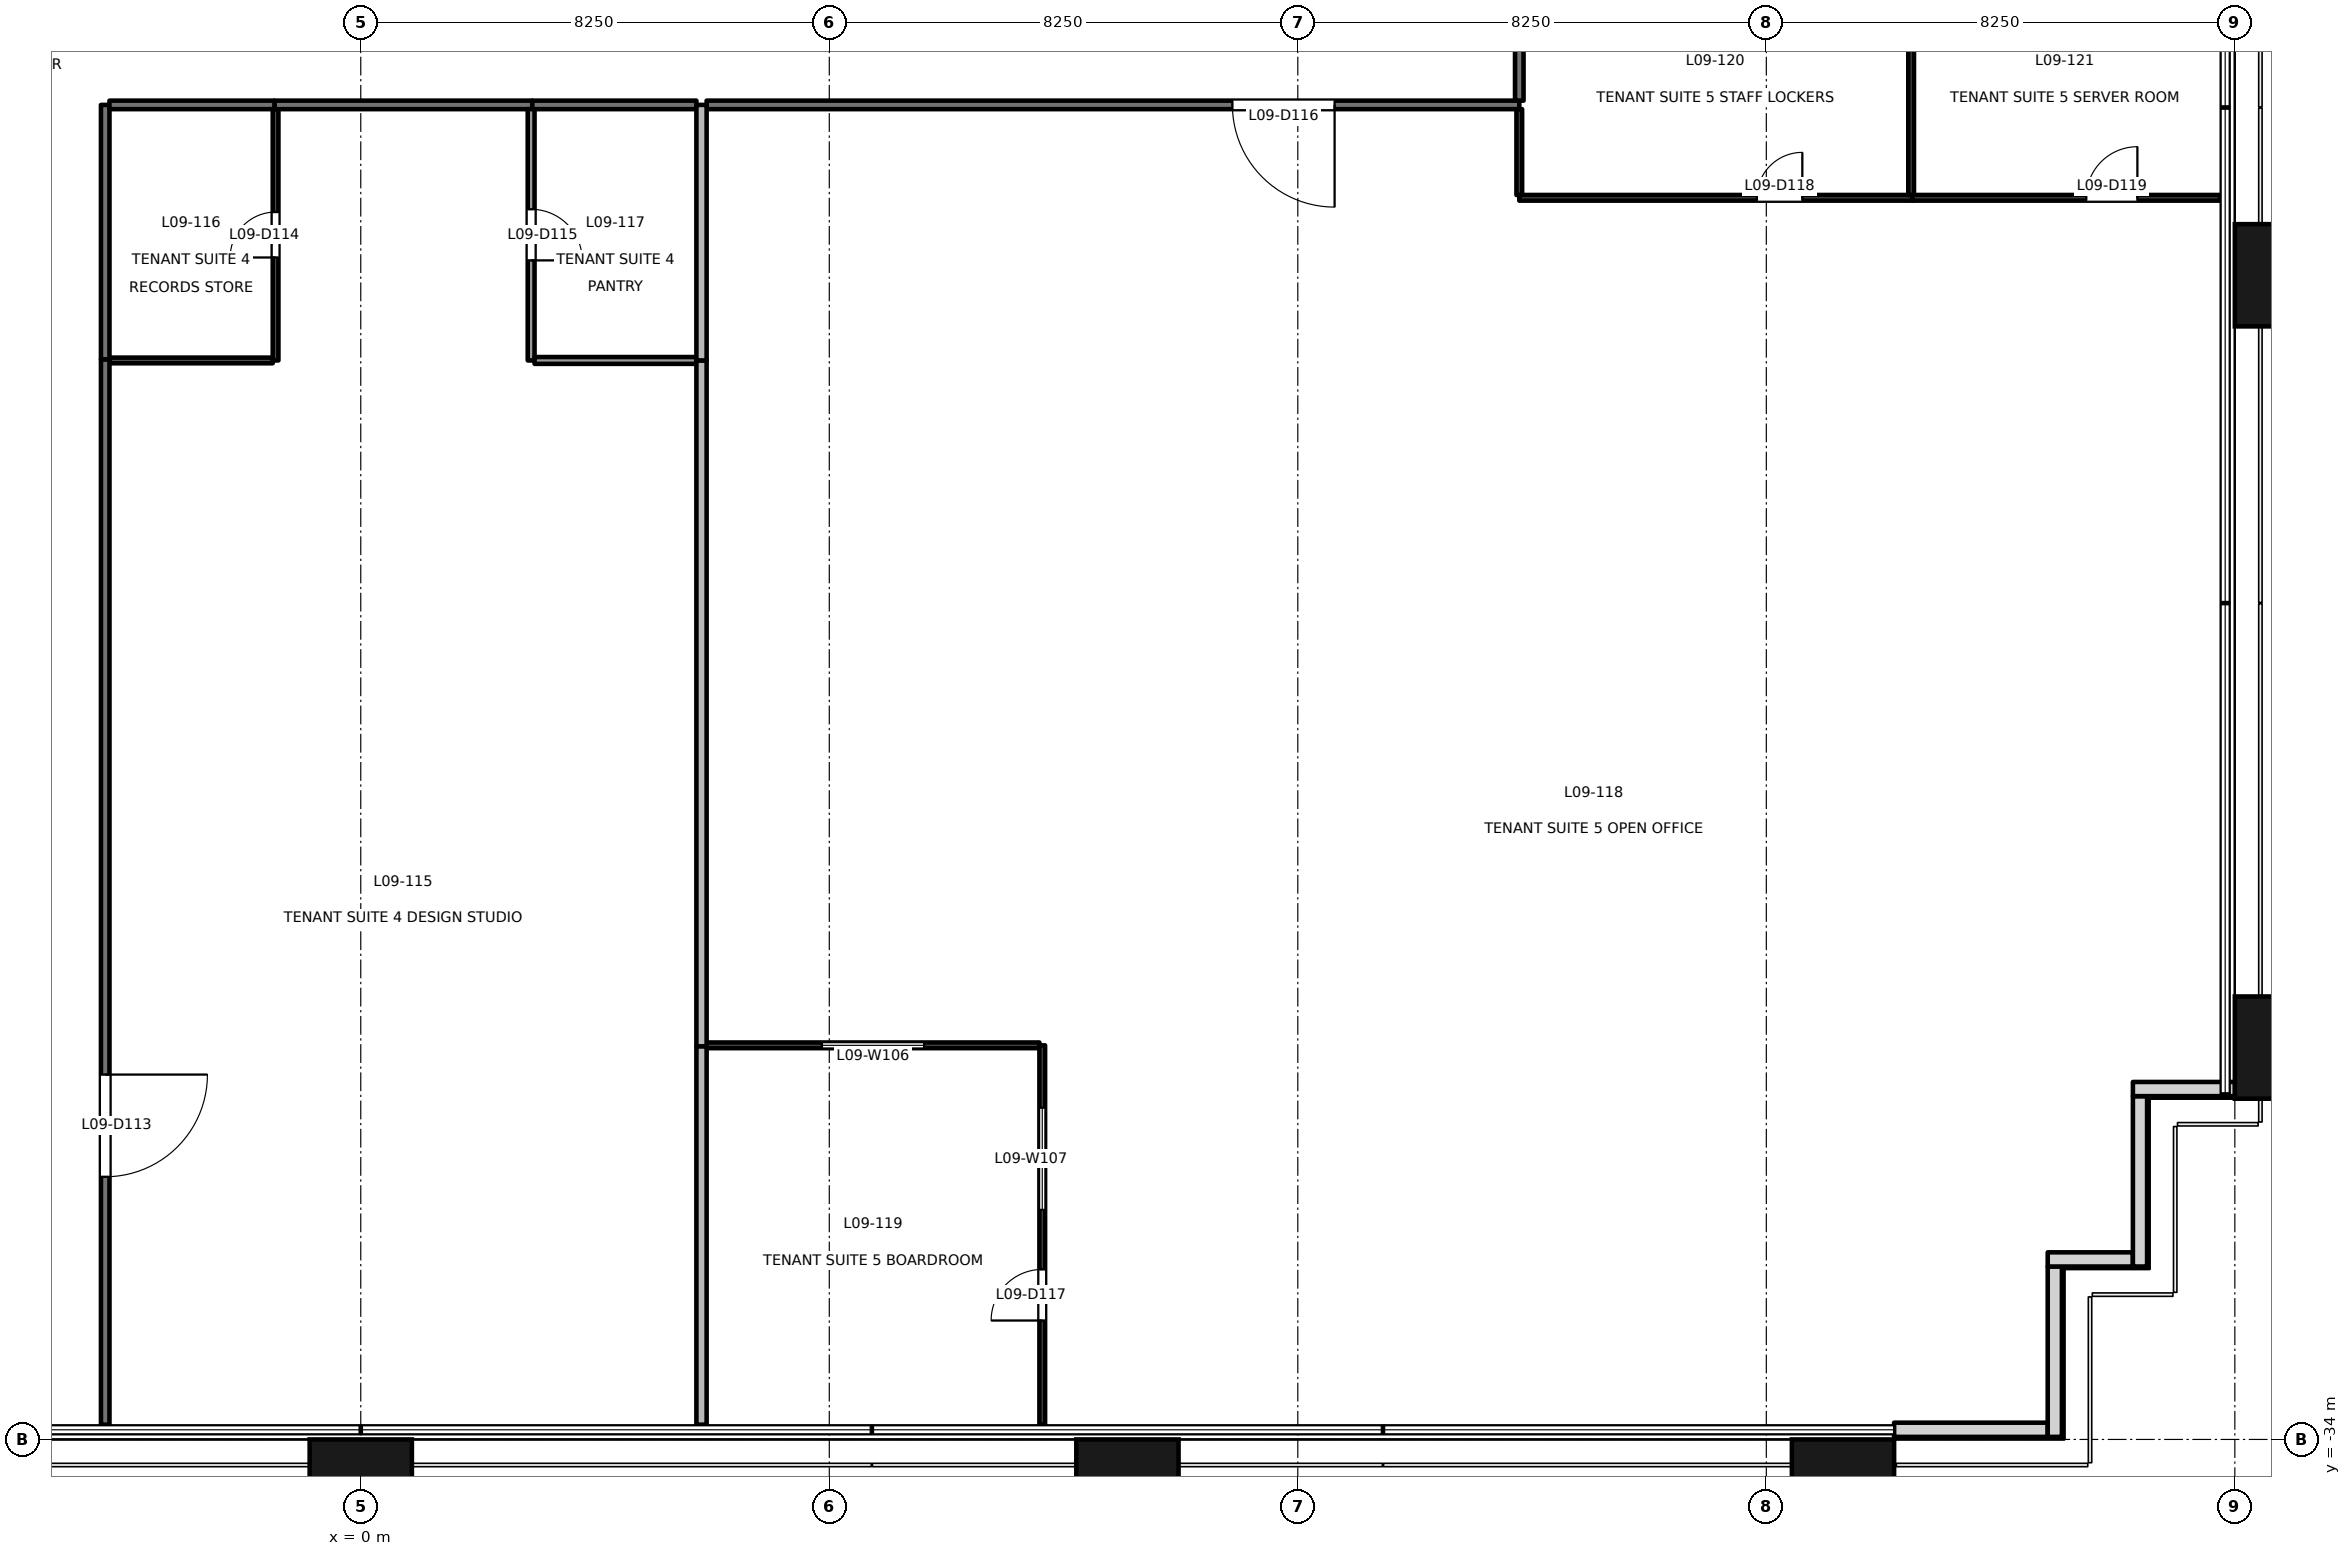
"""IFC4 building model, lengths in metres.
Left out: names, types, materials, properties, quantities, classifications, styles, units other than length and angle.
Written with IfcOpenShell. Run it as: python <this file> out.ifc"""

import sys

from ifc_helpers import new_model, si_unit, direction, frame, frame_2d, origin, origin_2d, place, context, subcontext, project, spatial, rectangle, extrude, element, fill, save


model = new_model("IFC4")
c1 = context("Model", 3, precision=1e-05, world=origin(), true_north=direction((0.0, 1.0)))
c2 = subcontext(c1, "Body", "Model", "MODEL_VIEW")
j1 = project(units=[si_unit("LENGTHUNIT", "METRE"), si_unit("PLANEANGLEUNIT", "RADIAN")], contexts=[c1])
p1 = place(None, origin())
s1 = spatial("IfcSite", under=j1, at=p1, CompositionType="ELEMENT")
p2 = place(p1, origin())
s2 = spatial("IfcBuilding", under=s1, at=p2, CompositionType="ELEMENT")
p3 = place(p2, frame((0.0, 0.0, 44.7)))
s3 = spatial("IfcBuildingStorey", under=s2, at=p3, CompositionType="ELEMENT", Elevation=44.7)
for number, where, z_axis, x_axis in (
    (1, (0.0, -34.9, -0.2), (0.0, 0.0, 1.0), (1.0, 0.0, 0.0)),
    (2, (13.5, -34.9, -0.2), (0.0, 0.0, 1.0), (1.0, 0.0, 0.0)),
    (3, (26.1, -34.9, -0.2), (0.0, 0.0, 1.0), (1.0, 0.0, 0.0)),
    (4, (33.9, -27.1, -0.2), (0.0, 0.0, 1.0), (0.0, 1.0, 0.0)),
    (5, (33.9, -13.5, -0.2), (0.0, 0.0, 1.0), (0.0, 1.0, 0.0)),
):
    element("IfcColumn", number, at=place(p3, frame(where, z_axis=z_axis, x_axis=x_axis)), inside=s3, PredefinedType="COLUMN", context=c2, shape_type="SweptSolid", body=[
        extrude(rectangle(XDim=1.8, YDim=1.8, at=origin_2d()), origin(), (0.0, 0.0, 1.0), 4.1),
    ])
p4 = place(p3, frame((27.0, -33.83, 0.0), z_axis=(0.0, 0.0, 1.0), x_axis=(1.0, 0.0, 0.0)))
e6 = element("IfcWall", 6, at=p4, inside=s3, PredefinedType="SOLIDWALL", context=c2, shape_type="SweptSolid", body=[
    extrude(rectangle(XDim=2.705, YDim=0.25, at=frame_2d((1.353, 0.0))), origin(), (0.0, 0.0, 1.0), 3.9),
])
p5 = place(p3, frame((29.83, -33.955, 0.0), z_axis=(0.0, 0.0, 1.0), x_axis=(0.0, 1.0, 0.0)))
e7 = element("IfcWall", 7, at=p5, inside=s3, PredefinedType="SOLIDWALL", context=c2, shape_type="SweptSolid", body=[
    extrude(rectangle(XDim=3.0, YDim=0.25, at=frame_2d((1.5, 0.0))), origin(), (0.0, 0.0, 1.0), 3.9),
])
p6 = place(p3, frame((29.705, -30.83, 0.0), z_axis=(0.0, 0.0, 1.0), x_axis=(1.0, 0.0, 0.0)))
e8 = element("IfcWall", 8, at=p6, inside=s3, PredefinedType="SOLIDWALL", context=c2, shape_type="SweptSolid", body=[
    extrude(rectangle(XDim=1.5, YDim=0.25, at=frame_2d((0.75, 0.0))), origin(), (0.0, 0.0, 1.0), 3.9),
])
p7 = place(p3, frame((31.33, -30.955, 0.0), z_axis=(0.0, 0.0, 1.0), x_axis=(0.0, 1.0, 0.0)))
e9 = element("IfcWall", 9, at=p7, inside=s3, PredefinedType="SOLIDWALL", context=c2, shape_type="SweptSolid", body=[
    extrude(rectangle(XDim=3.0, YDim=0.25, at=frame_2d((1.5, 0.0))), origin(), (0.0, 0.0, 1.0), 3.9),
])
p8 = place(p3, frame((31.205, -27.83, 0.0), z_axis=(0.0, 0.0, 1.0), x_axis=(1.0, 0.0, 0.0)))
e10 = element("IfcWall", 10, at=p8, inside=s3, PredefinedType="SOLIDWALL", context=c2, shape_type="SweptSolid", body=[
    extrude(rectangle(XDim=1.8, YDim=0.25, at=frame_2d((0.9, 0.0))), origin(), (0.0, 0.0, 1.0), 3.9),
])
p9 = place(p3, frame((-4.5, -14.98, 0.0), z_axis=(0.0, 0.0, 1.0), x_axis=(0.0, -1.0, 0.0)))
e11 = element("IfcWall", 11, at=p9, inside=s3, PredefinedType="PARTITIONING", context=c2, shape_type="SweptSolid", body=[
    extrude(rectangle(XDim=18.76, YDim=0.15, at=frame_2d((9.38, 0.0))), origin(), (0.0, 0.0, 1.0), 2.9),
])
p10 = place(p9, frame((12.595, 0.0, 0.0)))
e12 = element("IfcOpeningElement", 12, at=p10, cuts=e11, PredefinedType="OPENING", context=c2, shape_type="SweptSolid", body=[
    extrude(rectangle(XDim=1.8, YDim=2.1, at=frame_2d((0.9, 1.05))), frame((0.0, 0.085, 0.0), z_axis=(0.0, -1.0, 0.0), x_axis=(1.0, 0.0, 0.0)), (0.0, 0.0, 1.0), 0.171),
])
p11 = place(p3, frame((3.02, -10.5, 0.0), z_axis=(0.0, 0.0, 1.0), x_axis=(-1.0, 0.0, 0.0)))
e13 = element("IfcWall", 13, at=p11, inside=s3, PredefinedType="PARTITIONING", context=c2, shape_type="SweptSolid", body=[
    extrude(rectangle(XDim=4.54, YDim=0.15, at=frame_2d((2.27, 0.0))), origin(), (0.0, 0.0, 1.0), 2.9),
])
p12 = place(p3, frame((-4.5, -10.5, 0.0), z_axis=(0.0, 0.0, 1.0), x_axis=(0.0, -1.0, 0.0)))
e14 = element("IfcWall", 14, at=p12, inside=s3, PredefinedType="PARTITIONING", context=c2, shape_type="SweptSolid", body=[
    extrude(rectangle(XDim=4.48, YDim=0.15, at=frame_2d((2.24, 0.0))), origin(), (0.0, 0.0, 1.0), 2.9),
])
p13 = place(p3, frame((-1.52, -10.5, 0.0), z_axis=(0.0, 0.0, 1.0), x_axis=(-1.0, 0.0, 0.0)))
e15 = element("IfcWall", 15, at=p13, inside=s3, PredefinedType="PARTITIONING", context=c2, shape_type="SweptSolid", body=[
    extrude(rectangle(XDim=2.905, YDim=0.15, at=frame_2d((1.453, 0.0))), origin(), (0.0, 0.0, 1.0), 2.9),
])
p14 = place(p3, frame((5.91, -10.5, 0.0), z_axis=(0.0, 0.0, 1.0), x_axis=(-1.0, 0.0, 0.0)))
e16 = element("IfcWall", 16, at=p14, inside=s3, PredefinedType="PARTITIONING", context=c2, shape_type="SweptSolid", body=[
    extrude(rectangle(XDim=2.89, YDim=0.15, at=frame_2d((1.445, 0.0))), origin(), (0.0, 0.0, 1.0), 2.9),
])
p15 = place(p3, frame((20.4, -10.5, 0.0), z_axis=(0.0, 0.0, 1.0), x_axis=(-1.0, 0.0, 0.0)))
e17 = element("IfcWall", 17, at=p15, inside=s3, PredefinedType="PARTITIONING", context=c2, shape_type="SweptSolid", body=[
    extrude(rectangle(XDim=14.31, YDim=0.15, at=frame_2d((7.155, 0.0))), origin(), (0.0, 0.0, 1.0), 2.5),
])
p16 = place(p15, frame((3.252, 0.0, 0.0)))
e18 = element("IfcOpeningElement", 18, at=p16, cuts=e17, PredefinedType="OPENING", context=c2, shape_type="SweptSolid", body=[
    extrude(rectangle(XDim=1.8, YDim=2.1, at=frame_2d((0.9, 1.05))), frame((0.0, 0.085, 0.0), z_axis=(0.0, -1.0, 0.0), x_axis=(1.0, 0.0, 0.0)), (0.0, 0.0, 1.0), 0.171),
])
p17 = place(p3, frame((20.4, -7.726, 0.0), z_axis=(0.0, 0.0, 1.0), x_axis=(0.0, -1.0, 0.0)))
e19 = element("IfcWall", 19, at=p17, inside=s3, PredefinedType="PARTITIONING", context=c2, shape_type="SweptSolid", body=[
    extrude(rectangle(XDim=2.699, YDim=0.15, at=frame_2d((1.35, 0.0))), origin(), (0.0, 0.0, 1.0), 3.3),
])
p18 = place(p3, frame((-4.425, -15.0, 0.0), z_axis=(0.0, 0.0, 1.0), x_axis=(1.0, 0.0, 0.0)))
e20 = element("IfcWall", 20, at=p18, inside=s3, PredefinedType="PARTITIONING", context=c2, shape_type="SweptSolid", body=[
    extrude(rectangle(XDim=2.875, YDim=0.1, at=frame_2d((1.438, 0.0))), origin(), (0.0, 0.0, 1.0), 2.9),
])
p19 = place(p3, frame((-1.5, -15.0, 0.0), z_axis=(0.0, 0.0, 1.0), x_axis=(0.0, 1.0, 0.0)))
e21 = element("IfcWall", 21, at=p19, inside=s3, PredefinedType="PARTITIONING", context=c2, shape_type="SweptSolid", body=[
    extrude(rectangle(XDim=4.425, YDim=0.1, at=frame_2d((2.212, 0.0))), origin(), (0.0, 0.0, 1.0), 3.9),
])
p20 = place(p19, frame((1.813, 0.0, 0.0)))
e22 = element("IfcOpeningElement", 22, at=p20, cuts=e21, PredefinedType="OPENING", context=c2, shape_type="SweptSolid", body=[
    extrude(rectangle(XDim=0.8, YDim=2.1, at=frame_2d((0.4, 1.05))), frame((0.0, 0.061, 0.0), z_axis=(0.0, -1.0, 0.0), x_axis=(1.0, 0.0, 0.0)), (0.0, 0.0, 1.0), 0.121),
])
p21 = place(p3, frame((3.0, -10.575, 0.0), z_axis=(0.0, 0.0, 1.0), x_axis=(0.0, -1.0, 0.0)))
e23 = element("IfcWall", 23, at=p21, inside=s3, PredefinedType="PARTITIONING", context=c2, shape_type="SweptSolid", body=[
    extrude(rectangle(XDim=4.425, YDim=0.12, at=frame_2d((2.212, 0.0))), origin(), (0.0, 0.0, 1.0), 3.9),
])
p22 = place(p21, frame((1.763, 0.0, 0.0)))
e24 = element("IfcOpeningElement", 24, at=p22, cuts=e23, PredefinedType="OPENING", context=c2, shape_type="SweptSolid", body=[
    extrude(rectangle(XDim=0.9, YDim=2.1, at=frame_2d((0.45, 1.05))), frame((0.0, 0.071, 0.0), z_axis=(0.0, -1.0, 0.0), x_axis=(1.0, 0.0, 0.0)), (0.0, 0.0, 1.0), 0.141),
])
p23 = place(p3, frame((3.06, -15.0, 0.0), z_axis=(0.0, 0.0, 1.0), x_axis=(1.0, 0.0, 0.0)))
e25 = element("IfcWall", 25, at=p23, inside=s3, PredefinedType="PARTITIONING", context=c2, shape_type="SweptSolid", body=[
    extrude(rectangle(XDim=2.85, YDim=0.12, at=frame_2d((1.425, 0.0))), origin(), (0.0, 0.0, 1.0), 2.9),
])
p24 = place(p3, frame((6.0, -15.0, 0.0), z_axis=(0.0, 0.0, 1.0), x_axis=(0.0, -1.0, 0.0)))
e26 = element("IfcWall", 26, at=p24, inside=s3, PredefinedType="PARTITIONING", context=c2, shape_type="SweptSolid", body=[
    extrude(rectangle(XDim=12.08, YDim=0.18, at=frame_2d((6.04, 0.0))), origin(), (0.0, 0.0, 1.0), 3.9),
])
p25 = place(p3, frame((6.0, -27.08, 0.0), z_axis=(0.0, 0.0, 1.0), x_axis=(0.0, -1.0, 0.0)))
e27 = element("IfcWall", 27, at=p25, inside=s3, PredefinedType="PARTITIONING", context=c2, shape_type="SweptSolid", body=[
    extrude(rectangle(XDim=6.66, YDim=0.18, at=frame_2d((3.33, 0.0))), origin(), (0.0, 0.0, 1.0), 3.9),
])
p26 = place(p3, frame((6.0, -10.5, 0.0), z_axis=(0.0, 0.0, 1.0), x_axis=(0.0, -1.0, 0.0)))
e28 = element("IfcWall", 28, at=p26, inside=s3, PredefinedType="PARTITIONING", context=c2, shape_type="SweptSolid", body=[
    extrude(rectangle(XDim=4.5, YDim=0.18, at=frame_2d((2.25, 0.0))), origin(), (0.0, 0.0, 1.0), 3.9),
])
p27 = place(p3, frame((11.95, -27.06, 0.0), z_axis=(0.0, 0.0, 1.0), x_axis=(-1.0, 0.0, 0.0)))
e29 = element("IfcWall", 29, at=p27, inside=s3, PredefinedType="PARTITIONING", context=c2, shape_type="SweptSolid", body=[
    extrude(rectangle(XDim=5.86, YDim=0.1, at=frame_2d((2.93, 0.0))), origin(), (0.0, 0.0, 1.0), 2.9),
])
p28 = place(p27, frame((2.03, 0.0, 0.9)))
e30 = element("IfcOpeningElement", 30, at=p28, cuts=e29, PredefinedType="OPENING", context=c2, shape_type="SweptSolid", body=[
    extrude(rectangle(XDim=1.8, YDim=1.2, at=frame_2d((0.9, 0.6))), frame((0.0, 0.061, 0.0), z_axis=(0.0, -1.0, 0.0), x_axis=(1.0, 0.0, 0.0)), (0.0, 0.0, 1.0), 0.121),
])
p29 = place(p3, frame((12.0, -33.74, 0.0), z_axis=(0.0, 0.0, 1.0), x_axis=(0.0, 1.0, 0.0)))
e31 = element("IfcWall", 31, at=p29, inside=s3, PredefinedType="PARTITIONING", context=c2, shape_type="SweptSolid", body=[
    extrude(rectangle(XDim=6.68, YDim=0.1, at=frame_2d((3.34, 0.0))), origin(), (0.0, 0.0, 1.0), 3.9),
])
p30 = place(p29, frame((1.834, 0.0, 0.0)))
e32 = element("IfcOpeningElement", 32, at=p30, cuts=e31, PredefinedType="OPENING", context=c2, shape_type="SweptSolid", body=[
    extrude(rectangle(XDim=0.9, YDim=2.1, at=frame_2d((0.45, 1.05))), frame((0.0, 0.061, 0.0), z_axis=(0.0, -1.0, 0.0), x_axis=(1.0, 0.0, 0.0)), (0.0, 0.0, 1.0), 0.121),
])
p31 = place(p29, frame((3.782, 0.0, 0.9)))
e33 = element("IfcOpeningElement", 33, at=p31, cuts=e31, PredefinedType="OPENING", context=c2, shape_type="SweptSolid", body=[
    extrude(rectangle(XDim=1.8, YDim=1.2, at=frame_2d((0.9, 0.6))), frame((0.0, 0.061, 0.0), z_axis=(0.0, -1.0, 0.0), x_axis=(1.0, 0.0, 0.0)), (0.0, 0.0, 1.0), 0.121),
])
p32 = place(p3, frame((20.4, -12.136, 0.0), z_axis=(0.0, 0.0, 1.0), x_axis=(1.0, 0.0, 0.0)))
e34 = element("IfcWall", 34, at=p32, inside=s3, PredefinedType="PARTITIONING", context=c2, shape_type="SweptSolid", body=[
    extrude(rectangle(XDim=6.92, YDim=0.1, at=frame_2d((3.46, 0.0))), origin(), (0.0, 0.0, 1.0), 3.9),
])
p33 = place(p32, frame((4.184, 0.0, 0.0)))
e35 = element("IfcOpeningElement", 35, at=p33, cuts=e34, PredefinedType="OPENING", context=c2, shape_type="SweptSolid", body=[
    extrude(rectangle(XDim=0.8, YDim=2.1, at=frame_2d((0.4, 1.05))), frame((0.0, 0.061, 0.0), z_axis=(0.0, -1.0, 0.0), x_axis=(1.0, 0.0, 0.0)), (0.0, 0.0, 1.0), 0.121),
])
p34 = place(p3, frame((20.4, -10.575, 0.0), z_axis=(0.0, 0.0, 1.0), x_axis=(0.0, -1.0, 0.0)))
e36 = element("IfcWall", 36, at=p34, inside=s3, PredefinedType="PARTITIONING", context=c2, shape_type="SweptSolid", body=[
    extrude(rectangle(XDim=1.511, YDim=0.1, at=frame_2d((0.755, 0.0))), origin(), (0.0, 0.0, 1.0), 3.9),
])
p35 = place(p3, frame((27.32, -12.136, 0.0), z_axis=(0.0, 0.0, 1.0), x_axis=(1.0, 0.0, 0.0)))
e37 = element("IfcWall", 37, at=p35, inside=s3, PredefinedType="PARTITIONING", context=c2, shape_type="SweptSolid", body=[
    extrude(rectangle(XDim=5.42, YDim=0.1, at=frame_2d((2.71, 0.0))), origin(), (0.0, 0.0, 1.0), 3.9),
])
p36 = place(p35, frame((3.064, 0.0, 0.0)))
e38 = element("IfcOpeningElement", 38, at=p36, cuts=e37, PredefinedType="OPENING", context=c2, shape_type="SweptSolid", body=[
    extrude(rectangle(XDim=0.9, YDim=2.1, at=frame_2d((0.45, 1.05))), frame((0.0, 0.061, 0.0), z_axis=(0.0, -1.0, 0.0), x_axis=(1.0, 0.0, 0.0)), (0.0, 0.0, 1.0), 0.121),
])
p37 = place(p3, frame((27.3, -7.726, 0.0), z_axis=(0.0, 0.0, 1.0), x_axis=(0.0, -1.0, 0.0)))
e39 = element("IfcWall", 39, at=p37, inside=s3, PredefinedType="PARTITIONING", context=c2, shape_type="SweptSolid", body=[
    extrude(rectangle(XDim=4.36, YDim=0.1, at=frame_2d((2.18, 0.0))), origin(), (0.0, 0.0, 1.0), 3.3),
])
p38 = place(p10, origin())
e40 = element("IfcDoor", 40, at=p38, inside=s3, OperationType="DOUBLE_DOOR_SINGLE_SWING", PredefinedType="DOOR", context=c2, shape_type="SweptSolid", body=[
    extrude(rectangle(XDim=1.8, YDim=2.1, at=frame_2d((0.9, 1.05))), frame((0.0, 0.025, 0.0), z_axis=(0.0, -1.0, 0.0), x_axis=(1.0, 0.0, 0.0)), (0.0, 0.0, 1.0), 0.05),
])
fill(e12, e40)
p39 = place(p20, origin())
e41 = element("IfcDoor", 41, at=p39, inside=s3, OperationType="SINGLE_SWING_LEFT", PredefinedType="DOOR", context=c2, shape_type="SweptSolid", body=[
    extrude(rectangle(XDim=0.8, YDim=2.1, at=frame_2d((0.4, 1.05))), frame((0.0, 0.025, 0.0), z_axis=(0.0, -1.0, 0.0), x_axis=(1.0, 0.0, 0.0)), (0.0, 0.0, 1.0), 0.05),
])
fill(e22, e41)
p40 = place(p22, origin())
e42 = element("IfcDoor", 42, at=p40, inside=s3, OperationType="SINGLE_SWING_RIGHT", PredefinedType="DOOR", context=c2, shape_type="SweptSolid", body=[
    extrude(rectangle(XDim=0.9, YDim=2.1, at=frame_2d((0.45, 1.05))), frame((0.0, 0.025, 0.0), z_axis=(0.0, -1.0, 0.0), x_axis=(1.0, 0.0, 0.0)), (0.0, 0.0, 1.0), 0.05),
])
fill(e24, e42)
p41 = place(p16, origin())
e43 = element("IfcDoor", 43, at=p41, inside=s3, OperationType="DOUBLE_DOOR_SINGLE_SWING", PredefinedType="DOOR", context=c2, shape_type="SweptSolid", body=[
    extrude(rectangle(XDim=1.8, YDim=2.1, at=frame_2d((0.9, 1.05))), frame((0.0, 0.025, 0.0), z_axis=(0.0, -1.0, 0.0), x_axis=(1.0, 0.0, 0.0)), (0.0, 0.0, 1.0), 0.05),
])
fill(e18, e43)
p42 = place(p30, origin())
e44 = element("IfcDoor", 44, at=p42, inside=s3, OperationType="SINGLE_SWING_LEFT", PredefinedType="DOOR", context=c2, shape_type="SweptSolid", body=[
    extrude(rectangle(XDim=0.9, YDim=2.1, at=frame_2d((0.45, 1.05))), frame((0.0, 0.025, 0.0), z_axis=(0.0, -1.0, 0.0), x_axis=(1.0, 0.0, 0.0)), (0.0, 0.0, 1.0), 0.05),
])
fill(e32, e44)
p43 = place(p33, origin())
e45 = element("IfcDoor", 45, at=p43, inside=s3, OperationType="SINGLE_SWING_RIGHT", PredefinedType="DOOR", context=c2, shape_type="SweptSolid", body=[
    extrude(rectangle(XDim=0.8, YDim=2.1, at=frame_2d((0.4, 1.05))), frame((0.0, 0.025, 0.0), z_axis=(0.0, -1.0, 0.0), x_axis=(1.0, 0.0, 0.0)), (0.0, 0.0, 1.0), 0.05),
])
fill(e35, e45)
p44 = place(p36, origin())
e46 = element("IfcDoor", 46, at=p44, inside=s3, OperationType="SINGLE_SWING_RIGHT", PredefinedType="DOOR", context=c2, shape_type="SweptSolid", body=[
    extrude(rectangle(XDim=0.9, YDim=2.1, at=frame_2d((0.45, 1.05))), frame((0.0, 0.025, 0.0), z_axis=(0.0, -1.0, 0.0), x_axis=(1.0, 0.0, 0.0)), (0.0, 0.0, 1.0), 0.05),
])
fill(e38, e46)
p45 = place(p28, origin())
e47 = element("IfcWindow", 47, at=p45, inside=s3, PartitioningType="SINGLE_PANEL", PredefinedType="WINDOW", context=c2, shape_type="SweptSolid", body=[
    extrude(rectangle(XDim=1.8, YDim=1.2, at=frame_2d((0.9, 0.6))), frame((0.0, 0.03, 0.0), z_axis=(0.0, -1.0, 0.0), x_axis=(1.0, 0.0, 0.0)), (0.0, 0.0, 1.0), 0.06),
])
fill(e30, e47)
p46 = place(p31, origin())
e48 = element("IfcWindow", 48, at=p46, inside=s3, PartitioningType="SINGLE_PANEL", PredefinedType="WINDOW", context=c2, shape_type="SweptSolid", body=[
    extrude(rectangle(XDim=1.8, YDim=1.2, at=frame_2d((0.9, 0.6))), frame((0.0, 0.03, 0.0), z_axis=(0.0, -1.0, 0.0), x_axis=(1.0, 0.0, 0.0)), (0.0, 0.0, 1.0), 0.06),
])
fill(e33, e48)
save(model, sys.argv[1])
